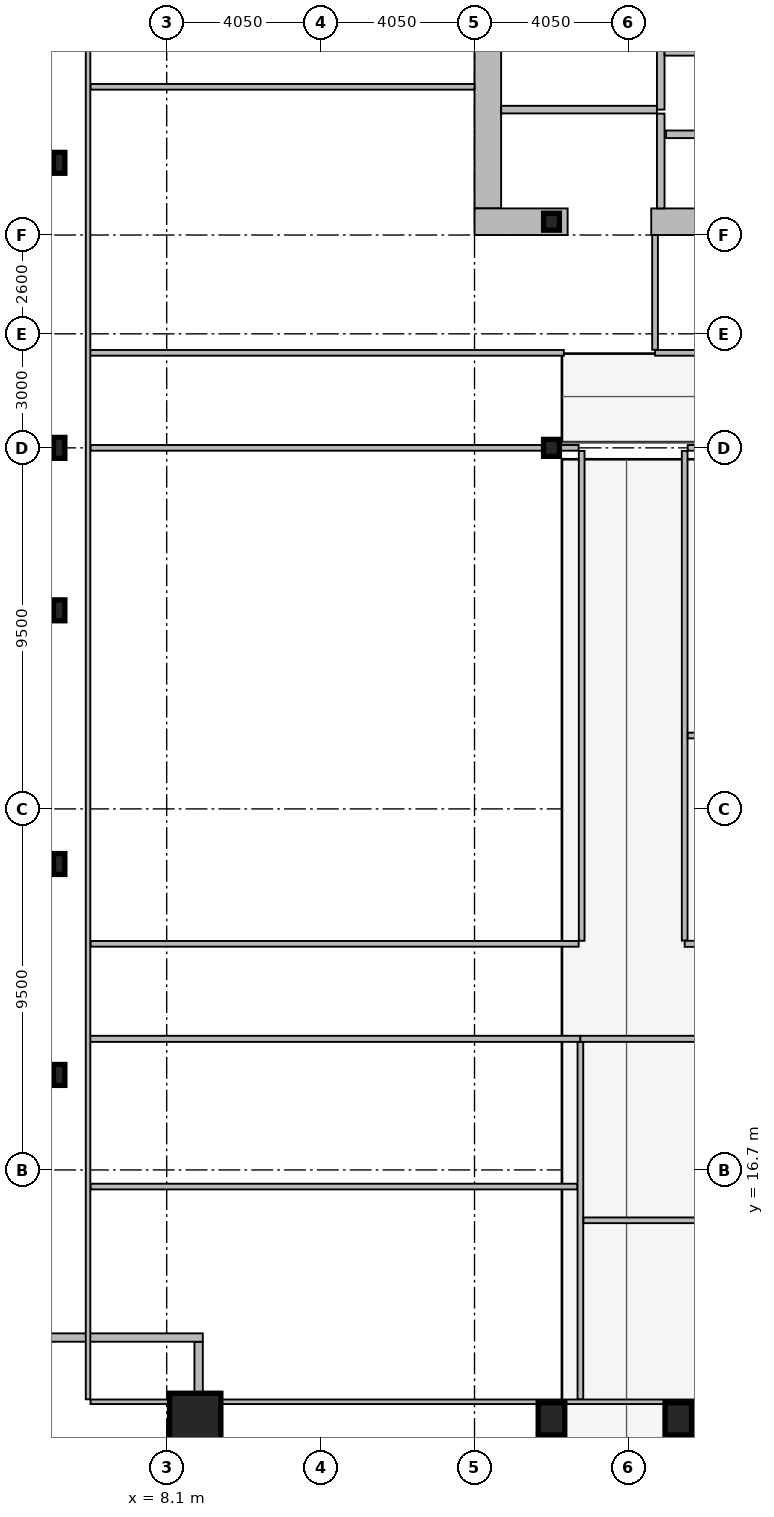
"""IFC4 building model, lengths in metres.
Left out: names, types, materials, properties, quantities, classifications, styles, units other than length and angle.
Written with IfcOpenShell. Run it as: python <this file> out.ifc"""

import sys

from ifc_helpers import new_model, si_unit, direction, frame, frame_2d, origin, origin_2d, place, context, subcontext, project, spatial, rectangle, hollow_rectangle, i_section, extrude, element, fill, save


model = new_model("IFC4")
c1 = context("Model", 3, precision=1e-05, world=origin(), true_north=direction((0.0, 1.0)))
c2 = subcontext(c1, "Body", "Model", "MODEL_VIEW")
j1 = project(units=[si_unit("LENGTHUNIT", "METRE"), si_unit("PLANEANGLEUNIT", "RADIAN")], contexts=[c1])
p1 = place(None, origin())
s1 = spatial("IfcSite", under=j1, at=p1, CompositionType="ELEMENT")
p2 = place(p1, origin())
s2 = spatial("IfcBuilding", under=s1, at=p2, CompositionType="ELEMENT")
p3 = place(p2, frame((0.0, 0.0, 154.2)))
s3 = spatial("IfcBuildingStorey", under=s2, at=p3, CompositionType="ELEMENT", Elevation=154.2)
p4 = place(p3, frame((16.55, 42.0, 0.0), z_axis=(0.0, 0.0, 1.0), x_axis=(0.0, 1.0, 0.0)))
e1 = element("IfcWall", 1, at=p4, inside=s3, PredefinedType="SHEAR", context=c2, shape_type="SweptSolid", body=[
    extrude(rectangle(XDim=11.0, YDim=0.7, at=frame_2d((5.5, 0.0))), origin(), (0.0, 0.0, 1.0), 3.44),
])
p5 = place(p3, frame((18.65, 41.65, 0.0), z_axis=(0.0, 0.0, 1.0), x_axis=(-1.0, 0.0, 0.0)))
e2 = element("IfcWall", 2, at=p5, inside=s3, PredefinedType="SHEAR", context=c2, shape_type="SweptSolid", body=[
    extrude(rectangle(XDim=2.45, YDim=0.7, at=frame_2d((1.225, 0.0))), origin(), (0.0, 0.0, 1.0), 3.44),
])
p6 = place(p3, frame((32.3, 41.65, 0.0), z_axis=(0.0, 0.0, 1.0), x_axis=(-1.0, 0.0, 0.0)))
e3 = element("IfcWall", 3, at=p6, inside=s3, PredefinedType="SHEAR", context=c2, shape_type="SweptSolid", body=[
    extrude(rectangle(XDim=11.45, YDim=0.7, at=frame_2d((5.725, 0.0))), origin(), (0.0, 0.0, 1.0), 3.44),
])
p7 = place(p3, frame((8.85, 10.15, 0.0), z_axis=(0.0, 0.0, 1.0), x_axis=(1.0, 0.0, 0.0)))
e4 = element("IfcColumn", 4, at=p7, inside=s3, PredefinedType="COLUMN", context=c2, shape_type="SweptSolid", body=[
    extrude(hollow_rectangle(XDim=1.35, YDim=1.35, WallThickness=0.065, at=origin_2d()), origin(), (0.0, 0.0, 1.0), 3.6),
])
for number, where, z_axis, x_axis in (
    (5, (18.225, 10.15, 0.0), (0.0, 0.0, 1.0), (1.0, 0.0, 0.0)),
    (6, (21.562, 10.15, 0.0), (0.0, 0.0, 1.0), (1.0, 0.0, 0.0)),
):
    element("IfcColumn", number, at=place(p3, frame(where, z_axis=z_axis, x_axis=x_axis)), inside=s3, PredefinedType="COLUMN", context=c2, shape_type="SweptSolid", body=[
        extrude(hollow_rectangle(XDim=0.7, YDim=0.85, WallThickness=0.05, at=origin_2d()), origin(), (0.0, 0.0, 1.0), 3.6),
    ])
for number, where, z_axis, x_axis in (
    (7, (5.27, 19.2, 0.0), (0.0, 0.0, 1.0), (1.0, 0.0, 0.0)),
    (8, (5.27, 24.75, 0.0), (0.0, 0.0, 1.0), (1.0, 0.0, 0.0)),
    (9, (5.27, 31.425, 0.0), (0.0, 0.0, 1.0), (1.0, 0.0, 0.0)),
    (10, (5.27, 35.7, 0.0), (0.0, 0.0, 1.0), (1.0, 0.0, 0.0)),
    (11, (5.27, 43.2, 0.0), (0.0, 0.0, 1.0), (1.0, 0.0, 0.0)),
):
    element("IfcColumn", number, at=place(p3, frame(where, z_axis=z_axis, x_axis=x_axis)), inside=s3, PredefinedType="COLUMN", context=c2, shape_type="SweptSolid", body=[
        extrude(i_section(OverallWidth=0.3, OverallDepth=0.55, WebThickness=0.015, FlangeThickness=0.029, at=origin_2d()), origin(), (0.0, 0.0, 1.0), 3.6),
    ])
for number, where, z_axis, x_axis in (
    (12, (18.225, 35.7, 0.0), (0.0, 0.0, 1.0), (1.0, 0.0, 0.0)),
    (13, (18.225, 41.65, 0.0), (0.0, 0.0, 1.0), (1.0, 0.0, 0.0)),
):
    element("IfcColumn", number, at=place(p3, frame(where, z_axis=z_axis, x_axis=x_axis)), inside=s3, PredefinedType="COLUMN", context=c2, shape_type="SweptSolid", body=[
        extrude(i_section(OverallWidth=0.416, OverallDepth=0.446, WebThickness=0.039, FlangeThickness=0.063, at=origin_2d()), origin(), (0.0, 0.0, 1.0), 3.6),
    ])
p8 = place(p3, frame((8.94, 8.27, 0.0), z_axis=(0.0, 0.0, 1.0), x_axis=(0.0, 1.0, 0.0)))
e14 = element("IfcWall", 14, at=p8, inside=s3, PredefinedType="SOLIDWALL", context=c2, shape_type="SweptSolid", body=[
    extrude(rectangle(XDim=3.91, YDim=0.22, at=frame_2d((1.955, 0.0))), origin(), (0.0, 0.0, 1.0), 2.83),
])
p9 = place(p3, frame((9.05, 12.29, 0.0), z_axis=(0.0, 0.0, 1.0), x_axis=(-1.0, 0.0, 0.0)))
e15 = element("IfcWall", 15, at=p9, inside=s3, PredefinedType="SOLIDWALL", context=c2, shape_type="SweptSolid", body=[
    extrude(rectangle(XDim=4.22, YDim=0.22, at=frame_2d((2.11, 0.0))), origin(), (0.0, 0.0, 1.0), 2.83),
])
p10 = place(p3, frame((24.21, 43.95, 0.0), z_axis=(0.0, 0.0, 1.0), x_axis=(-1.0, 0.0, 0.0)))
e16 = element("IfcWall", 16, at=p10, inside=s3, PredefinedType="PARTITIONING", context=c2, shape_type="SweptSolid", body=[
    extrude(rectangle(XDim=2.97, YDim=0.2, at=frame_2d((1.485, 0.0))), origin(), (0.0, 0.0, 1.0), 3.44),
])
p11 = place(p10, frame((0.86, 0.0, 0.0)))
e17 = element("IfcOpeningElement", 17, at=p11, cuts=e16, PredefinedType="OPENING", context=c2, shape_type="SweptSolid", body=[
    extrude(rectangle(XDim=1.3, YDim=2.18, at=frame_2d((0.65, 1.09))), frame((0.0, 0.11, 0.0), z_axis=(0.0, -1.0, 0.0), x_axis=(1.0, 0.0, 0.0)), (0.0, 0.0, 1.0), 0.22),
])
p12 = place(p3, frame((21.1, 44.6, 0.0), z_axis=(0.0, 0.0, 1.0), x_axis=(0.0, 1.0, 0.0)))
e18 = element("IfcWall", 18, at=p12, inside=s3, PredefinedType="PARTITIONING", context=c2, shape_type="SweptSolid", body=[
    extrude(rectangle(XDim=4.3, YDim=0.2, at=frame_2d((2.15, 0.0))), origin(), (0.0, 0.0, 1.0), 3.44),
])
p13 = place(p3, frame((16.9, 44.6, 0.0), z_axis=(0.0, 0.0, 1.0), x_axis=(1.0, 0.0, 0.0)))
e19 = element("IfcWall", 19, at=p13, inside=s3, PredefinedType="PARTITIONING", context=c2, shape_type="SweptSolid", body=[
    extrude(rectangle(XDim=4.1, YDim=0.2, at=frame_2d((2.05, 0.0))), origin(), (0.0, 0.0, 1.0), 3.44),
])
p14 = place(p13, frame((1.25, 0.0, 0.0)))
e20 = element("IfcOpeningElement", 20, at=p14, cuts=e19, PredefinedType="OPENING", context=c2, shape_type="SweptSolid", body=[
    extrude(rectangle(XDim=1.05, YDim=2.15, at=frame_2d((0.525, 1.075))), frame((0.0, 0.11, 0.0), z_axis=(0.0, -1.0, 0.0), x_axis=(1.0, 0.0, 0.0)), (0.0, 0.0, 1.0), 0.22),
])
p15 = place(p3, frame((21.2, 46.12, 0.0), z_axis=(0.0, 0.0, 1.0), x_axis=(1.0, 0.0, 0.0)))
e21 = element("IfcWall", 21, at=p15, inside=s3, PredefinedType="PARTITIONING", context=c2, shape_type="SweptSolid", body=[
    extrude(rectangle(XDim=3.02, YDim=0.2, at=frame_2d((1.51, 0.0))), origin(), (0.0, 0.0, 1.0), 3.44),
])
p16 = place(p3, frame((21.1, 42.0, 0.0), z_axis=(0.0, 0.0, 1.0), x_axis=(0.0, 1.0, 0.0)))
e22 = element("IfcWall", 22, at=p16, inside=s3, PredefinedType="PARTITIONING", context=c2, shape_type="SweptSolid", body=[
    extrude(rectangle(XDim=2.495, YDim=0.2, at=frame_2d((1.248, 0.0))), origin(), (0.0, 0.0, 1.0), 3.44),
])
p17 = place(p16, frame((0.38, 0.0, 0.0)))
e23 = element("IfcOpeningElement", 23, at=p17, cuts=e22, PredefinedType="OPENING", context=c2, shape_type="SweptSolid", body=[
    extrude(rectangle(XDim=1.05, YDim=2.15, at=frame_2d((0.525, 1.075))), frame((0.0, 0.11, 0.0), z_axis=(0.0, -1.0, 0.0), x_axis=(1.0, 0.0, 0.0)), (0.0, 0.0, 1.0), 0.22),
])
p18 = place(p3, frame((20.95, 38.2, 0.0), z_axis=(0.0, 0.0, 1.0), x_axis=(1.0, 0.0, 0.0)))
e24 = element("IfcWall", 24, at=p18, inside=s3, PredefinedType="PARTITIONING", context=c2, shape_type="SweptSolid", body=[
    extrude(rectangle(XDim=3.35, YDim=0.15, at=frame_2d((1.675, 0.0))), origin(), (0.0, 0.0, 1.0), 3.44),
])
p19 = place(p18, frame((0.9, 0.0, 0.0)))
e25 = element("IfcOpeningElement", 25, at=p19, cuts=e24, PredefinedType="OPENING", context=c2, shape_type="SweptSolid", body=[
    extrude(rectangle(XDim=0.95, YDim=2.05, at=frame_2d((0.475, 1.025))), frame((0.0, 0.085, 0.0), z_axis=(0.0, -1.0, 0.0), x_axis=(1.0, 0.0, 0.0)), (0.0, 0.0, 1.0), 0.17),
])
p20 = place(p3, frame((20.95, 38.28, 0.0), z_axis=(0.0, 0.0, 1.0), x_axis=(0.0, 1.0, 0.0)))
e26 = element("IfcWall", 26, at=p20, inside=s3, PredefinedType="PARTITIONING", context=c2, shape_type="SweptSolid", body=[
    extrude(rectangle(XDim=3.02, YDim=0.15, at=frame_2d((1.51, 0.0))), origin(), (0.0, 0.0, 1.0), 3.44),
])
p21 = place(p3, frame((6.03, 38.2, 0.0), z_axis=(0.0, 0.0, 1.0), x_axis=(1.0, 0.0, 0.0)))
e27 = element("IfcWall", 27, at=p21, inside=s3, PredefinedType="PARTITIONING", context=c2, shape_type="SweptSolid", body=[
    extrude(rectangle(XDim=12.52, YDim=0.15, at=frame_2d((6.26, 0.0))), origin(), (0.0, 0.0, 1.0), 2.73),
])
p22 = place(p21, frame((8.32, 0.0, 0.0)))
e28 = element("IfcOpeningElement", 28, at=p22, cuts=e27, PredefinedType="OPENING", context=c2, shape_type="SweptSolid", body=[
    extrude(rectangle(XDim=0.95, YDim=2.05, at=frame_2d((0.475, 1.025))), frame((0.0, 0.085, 0.0), z_axis=(0.0, -1.0, 0.0), x_axis=(1.0, 0.0, 0.0)), (0.0, 0.0, 1.0), 0.17),
])
p23 = place(p3, frame((6.095, 45.2, 0.0), z_axis=(0.0, 0.0, 1.0), x_axis=(1.0, 0.0, 0.0)))
e29 = element("IfcWall", 29, at=p23, inside=s3, PredefinedType="PARTITIONING", context=c2, shape_type="SweptSolid", body=[
    extrude(rectangle(XDim=10.105, YDim=0.15, at=frame_2d((5.052, 0.0))), origin(), (0.0, 0.0, 1.0), 2.83),
])
p24 = place(p23, frame((8.32, 0.0, 0.0)))
e30 = element("IfcOpeningElement", 30, at=p24, cuts=e29, PredefinedType="OPENING", context=c2, shape_type="SweptSolid", body=[
    extrude(rectangle(XDim=0.9, YDim=2.05, at=frame_2d((0.45, 1.025))), frame((0.0, 0.085, 0.0), z_axis=(0.0, -1.0, 0.0), x_axis=(1.0, 0.0, 0.0)), (0.0, 0.0, 1.0), 0.17),
])
p25 = place(p3, frame((6.03, 20.15, 0.0), z_axis=(0.0, 0.0, 1.0), x_axis=(1.0, 0.0, 0.0)))
e31 = element("IfcWall", 31, at=p25, inside=s3, PredefinedType="PARTITIONING", context=c2, shape_type="SweptSolid", body=[
    extrude(rectangle(XDim=12.956, YDim=0.16, at=frame_2d((6.478, 0.0))), origin(), (0.0, 0.0, 1.0), 2.73),
])
p26 = place(p25, frame((5.691, 0.0, 0.0)))
e32 = element("IfcOpeningElement", 32, at=p26, cuts=e31, PredefinedType="OPENING", context=c2, shape_type="SweptSolid", body=[
    extrude(rectangle(XDim=1.0, YDim=2.05, at=frame_2d((0.5, 1.025))), frame((0.0, 0.09, 0.0), z_axis=(0.0, -1.0, 0.0), x_axis=(1.0, 0.0, 0.0)), (0.0, 0.0, 1.0), 0.18),
])
p27 = place(p3, frame((6.095, 16.263, 0.0), z_axis=(0.0, 0.0, 1.0), x_axis=(1.0, 0.0, 0.0)))
e33 = element("IfcWall", 33, at=p27, inside=s3, PredefinedType="PARTITIONING", context=c2, shape_type="SweptSolid", body=[
    extrude(rectangle(XDim=12.811, YDim=0.15, at=frame_2d((6.406, 0.0))), origin(), (0.0, 0.0, 1.0), 2.73),
])
p28 = place(p27, frame((5.83, 0.0, 0.0)))
e34 = element("IfcOpeningElement", 34, at=p28, cuts=e33, PredefinedType="OPENING", context=c2, shape_type="SweptSolid", body=[
    extrude(rectangle(XDim=0.9, YDim=2.05, at=frame_2d((0.45, 1.025))), frame((0.0, 0.085, 0.0), z_axis=(0.0, -1.0, 0.0), x_axis=(1.0, 0.0, 0.0)), (0.0, 0.0, 1.0), 0.17),
])
p29 = place(p3, frame((18.986, 20.15, 0.0), z_axis=(0.0, 0.0, 1.0), x_axis=(1.0, 0.0, 0.0)))
e35 = element("IfcWall", 35, at=p29, inside=s3, PredefinedType="PARTITIONING", context=c2, shape_type="SweptSolid", body=[
    extrude(rectangle(XDim=13.739, YDim=0.16, at=frame_2d((6.869, 0.0))), origin(), (0.0, 0.0, 1.0), 2.73),
])
p30 = place(p29, frame((6.02, 0.0, 0.0)))
e36 = element("IfcOpeningElement", 36, at=p30, cuts=e35, PredefinedType="OPENING", context=c2, shape_type="SweptSolid", body=[
    extrude(rectangle(XDim=1.0, YDim=2.05, at=frame_2d((0.5, 1.025))), frame((0.0, 0.09, 0.0), z_axis=(0.0, -1.0, 0.0), x_axis=(1.0, 0.0, 0.0)), (0.0, 0.0, 1.0), 0.18),
])
p31 = place(p3, frame((18.986, 10.665, 0.0), z_axis=(0.0, 0.0, 1.0), x_axis=(0.0, 1.0, 0.0)))
e37 = element("IfcWall", 37, at=p31, inside=s3, PredefinedType="PARTITIONING", context=c2, shape_type="SweptSolid", body=[
    extrude(rectangle(XDim=9.4, YDim=0.15, at=frame_2d((4.7, 0.0))), origin(), (0.0, 0.0, 1.0), 2.93),
])
p32 = place(p3, frame((19.066, 15.375, 0.0), z_axis=(0.0, 0.0, 1.0), x_axis=(1.0, 0.0, 0.0)))
e38 = element("IfcWall", 38, at=p32, inside=s3, PredefinedType="PARTITIONING", context=c2, shape_type="SweptSolid", body=[
    extrude(rectangle(XDim=13.579, YDim=0.15, at=frame_2d((6.79, 0.0))), origin(), (0.0, 0.0, 1.0), 2.73),
])
p33 = place(p32, frame((6.183, 0.0, 0.0)))
e39 = element("IfcOpeningElement", 39, at=p33, cuts=e38, PredefinedType="OPENING", context=c2, shape_type="SweptSolid", body=[
    extrude(rectangle(XDim=0.9, YDim=2.05, at=frame_2d((0.45, 1.025))), frame((0.0, 0.085, 0.0), z_axis=(0.0, -1.0, 0.0), x_axis=(1.0, 0.0, 0.0)), (0.0, 0.0, 1.0), 0.17),
])
p34 = place(p3, frame((19.02, 22.73, 0.0), z_axis=(0.0, 0.0, 1.0), x_axis=(0.0, 1.0, 0.0)))
e40 = element("IfcWall", 40, at=p34, inside=s3, PredefinedType="PARTITIONING", context=c2, shape_type="SweptSolid", body=[
    extrude(rectangle(XDim=12.89, YDim=0.15, at=frame_2d((6.445, 0.0))), origin(), (0.0, 0.0, 1.0), 2.93),
])
p35 = place(p34, frame((3.2, 0.0, 0.0)))
e41 = element("IfcOpeningElement", 41, at=p35, cuts=e40, PredefinedType="OPENING", context=c2, shape_type="SweptSolid", body=[
    extrude(rectangle(XDim=1.0, YDim=2.05, at=frame_2d((0.5, 1.025))), frame((0.0, 0.085, 0.0), z_axis=(0.0, -1.0, 0.0), x_axis=(1.0, 0.0, 0.0)), (0.0, 0.0, 1.0), 0.17),
])
for number, where, z_axis, x_axis in (
    (42, (6.095, 22.65, 0.0), (0.0, 0.0, 1.0), (1.0, 0.0, 0.0)),
    (43, (6.095, 35.7, 0.0), (0.0, 0.0, 1.0), (1.0, 0.0, 0.0)),
):
    element("IfcWall", number, at=place(p3, frame(where, z_axis=z_axis, x_axis=x_axis)), inside=s3, PredefinedType="PARTITIONING", context=c2, shape_type="SweptSolid", body=[
        extrude(rectangle(XDim=12.845, YDim=0.15, at=frame_2d((6.422, 0.0))), origin(), (0.0, 0.0, 1.0), 2.73),
    ])
p36 = place(p3, frame((21.73, 22.735, 0.0), z_axis=(0.0, 0.0, 1.0), x_axis=(0.0, 1.0, 0.0)))
e44 = element("IfcWall", 44, at=p36, inside=s3, PredefinedType="PARTITIONING", context=c2, shape_type="SweptSolid", body=[
    extrude(rectangle(XDim=12.885, YDim=0.15, at=frame_2d((6.442, 0.0))), origin(), (0.0, 0.0, 1.0), 2.93),
])
p37 = place(p3, frame((21.81, 35.7, 0.0), z_axis=(0.0, 0.0, 1.0), x_axis=(1.0, 0.0, 0.0)))
e45 = element("IfcWall", 45, at=p37, inside=s3, PredefinedType="PARTITIONING", context=c2, shape_type="SweptSolid", body=[
    extrude(rectangle(XDim=44.995, YDim=0.15, at=frame_2d((22.498, 0.0))), origin(), (0.0, 0.0, 1.0), 2.73),
])
p38 = place(p3, frame((21.73, 22.65, 0.0), z_axis=(0.0, 0.0, 1.0), x_axis=(1.0, 0.0, 0.0)))
e46 = element("IfcWall", 46, at=p38, inside=s3, PredefinedType="PARTITIONING", context=c2, shape_type="SweptSolid", body=[
    extrude(rectangle(XDim=7.222, YDim=0.16, at=frame_2d((3.611, 0.0))), origin(), (0.0, 0.0, 1.0), 2.73),
])
p39 = place(p38, frame((3.283, 0.0, 0.0)))
e47 = element("IfcOpeningElement", 47, at=p39, cuts=e46, PredefinedType="OPENING", context=c2, shape_type="SweptSolid", body=[
    extrude(rectangle(XDim=1.0, YDim=2.05, at=frame_2d((0.5, 1.025))), frame((0.0, 0.09, 0.0), z_axis=(0.0, -1.0, 0.0), x_axis=(1.0, 0.0, 0.0)), (0.0, 0.0, 1.0), 0.18),
])
p40 = place(p3, frame((21.81, 28.131, 0.0), z_axis=(0.0, 0.0, 1.0), x_axis=(1.0, 0.0, 0.0)))
e48 = element("IfcWall", 48, at=p40, inside=s3, PredefinedType="PARTITIONING", context=c2, shape_type="SweptSolid", body=[
    extrude(rectangle(XDim=7.062, YDim=0.15, at=frame_2d((3.531, 0.0))), origin(), (0.0, 0.0, 1.0), 2.73),
])
p41 = place(p40, frame((3.25, 0.0, 0.0)))
e49 = element("IfcOpeningElement", 49, at=p41, cuts=e48, PredefinedType="OPENING", context=c2, shape_type="SweptSolid", body=[
    extrude(rectangle(XDim=0.9, YDim=2.05, at=frame_2d((0.45, 1.025))), frame((0.0, 0.085, 0.0), z_axis=(0.0, -1.0, 0.0), x_axis=(1.0, 0.0, 0.0)), (0.0, 0.0, 1.0), 0.17),
])
p42 = place(p3, frame((6.03, 10.665, 0.0), z_axis=(0.0, 0.0, 1.0), x_axis=(0.0, 1.0, 0.0)))
e50 = element("IfcWall", 50, at=p42, inside=s3, PredefinedType="PARTITIONING", context=c2, shape_type="SweptSolid", body=[
    extrude(rectangle(XDim=42.11, YDim=0.12, at=frame_2d((21.055, 0.0))), origin(), (0.0, 0.0, 1.0), 2.73),
])
p43 = place(p3, frame((6.095, 10.6, 0.0), z_axis=(0.0, 0.0, 1.0), x_axis=(1.0, 0.0, 0.0)))
e51 = element("IfcWall", 51, at=p43, inside=s3, PredefinedType="PARTITIONING", context=c2, shape_type="SweptSolid", body=[
    extrude(rectangle(XDim=60.71, YDim=0.12, at=frame_2d((30.355, 0.0))), origin(), (0.0, 0.0, 1.0), 2.73),
])
p44 = place(p14, origin())
e52 = element("IfcDoor", 52, at=p44, inside=s3, OperationType="SINGLE_SWING_LEFT", PredefinedType="DOOR", context=c2, shape_type="SweptSolid", body=[
    extrude(rectangle(XDim=1.05, YDim=2.15, at=frame_2d((0.525, 1.075))), frame((0.0, 0.025, 0.0), z_axis=(0.0, -1.0, 0.0), x_axis=(1.0, 0.0, 0.0)), (0.0, 0.0, 1.0), 0.05),
])
fill(e20, e52)
p45 = place(p17, origin())
e53 = element("IfcDoor", 53, at=p45, inside=s3, OperationType="SINGLE_SWING_RIGHT", PredefinedType="DOOR", context=c2, shape_type="SweptSolid", body=[
    extrude(rectangle(XDim=1.05, YDim=2.15, at=frame_2d((0.525, 1.075))), frame((0.0, 0.025, 0.0), z_axis=(0.0, -1.0, 0.0), x_axis=(1.0, 0.0, 0.0)), (0.0, 0.0, 1.0), 0.05),
])
fill(e23, e53)
p46 = place(p19, origin())
e54 = element("IfcDoor", 54, at=p46, inside=s3, OperationType="SINGLE_SWING_LEFT", PredefinedType="DOOR", context=c2, shape_type="SweptSolid", body=[
    extrude(rectangle(XDim=0.95, YDim=2.05, at=frame_2d((0.475, 1.025))), frame((0.0, 0.025, 0.0), z_axis=(0.0, -1.0, 0.0), x_axis=(1.0, 0.0, 0.0)), (0.0, 0.0, 1.0), 0.05),
])
fill(e25, e54)
p47 = place(p22, origin())
e55 = element("IfcDoor", 55, at=p47, inside=s3, OperationType="SINGLE_SWING_RIGHT", PredefinedType="DOOR", context=c2, shape_type="SweptSolid", body=[
    extrude(rectangle(XDim=0.95, YDim=2.05, at=frame_2d((0.475, 1.025))), frame((0.0, 0.025, 0.0), z_axis=(0.0, -1.0, 0.0), x_axis=(1.0, 0.0, 0.0)), (0.0, 0.0, 1.0), 0.05),
])
fill(e28, e55)
p48 = place(p24, origin())
e56 = element("IfcDoor", 56, at=p48, inside=s3, OperationType="SINGLE_SWING_RIGHT", PredefinedType="DOOR", context=c2, shape_type="SweptSolid", body=[
    extrude(rectangle(XDim=0.9, YDim=2.05, at=frame_2d((0.45, 1.025))), frame((0.0, 0.025, 0.0), z_axis=(0.0, -1.0, 0.0), x_axis=(1.0, 0.0, 0.0)), (0.0, 0.0, 1.0), 0.05),
])
fill(e30, e56)
p49 = place(p26, origin())
e57 = element("IfcDoor", 57, at=p49, inside=s3, OperationType="SINGLE_SWING_RIGHT", PredefinedType="DOOR", context=c2, shape_type="SweptSolid", body=[
    extrude(rectangle(XDim=1.0, YDim=2.05, at=frame_2d((0.5, 1.025))), frame((0.0, 0.025, 0.0), z_axis=(0.0, -1.0, 0.0), x_axis=(1.0, 0.0, 0.0)), (0.0, 0.0, 1.0), 0.05),
])
fill(e32, e57)
p50 = place(p28, origin())
e58 = element("IfcDoor", 58, at=p50, inside=s3, OperationType="SINGLE_SWING_LEFT", PredefinedType="DOOR", context=c2, shape_type="SweptSolid", body=[
    extrude(rectangle(XDim=0.9, YDim=2.05, at=frame_2d((0.45, 1.025))), frame((0.0, 0.025, 0.0), z_axis=(0.0, -1.0, 0.0), x_axis=(1.0, 0.0, 0.0)), (0.0, 0.0, 1.0), 0.05),
])
fill(e34, e58)
p51 = place(p35, origin())
e59 = element("IfcDoor", 59, at=p51, inside=s3, OperationType="SINGLE_SWING_RIGHT", PredefinedType="DOOR", context=c2, shape_type="SweptSolid", body=[
    extrude(rectangle(XDim=1.0, YDim=2.05, at=frame_2d((0.5, 1.025))), frame((0.0, 0.025, 0.0), z_axis=(0.0, -1.0, 0.0), x_axis=(1.0, 0.0, 0.0)), (0.0, 0.0, 1.0), 0.05),
])
fill(e41, e59)
save(model, sys.argv[1])
